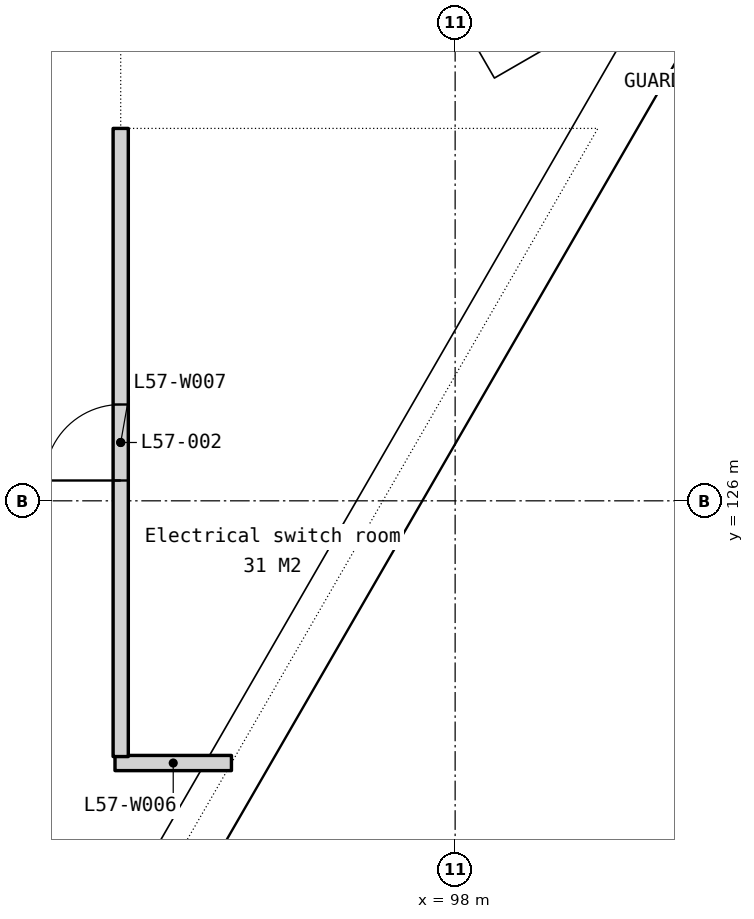
"""IFC4 building model, lengths in metres.
Left out: names, types, materials, properties, quantities, classifications, styles, units other than length and angle.
Written with IfcOpenShell. Run it as: python <this file> out.ifc"""

import sys

from ifc_helpers import new_model, si_unit, direction, frame, frame_2d, origin, place, context, subcontext, project, spatial, rectangle, extrude, element, fill, save


model = new_model("IFC4")
c1 = context("Model", 3, precision=1e-05, world=origin(), true_north=direction((0.0, 1.0)))
c2 = subcontext(c1, "Body", "Model", "MODEL_VIEW")
j1 = project(units=[si_unit("LENGTHUNIT", "METRE"), si_unit("PLANEANGLEUNIT", "RADIAN")], contexts=[c1])
p1 = place(None, origin())
s1 = spatial("IfcSite", under=j1, at=p1, CompositionType="ELEMENT")
p2 = place(p1, origin())
s2 = spatial("IfcBuilding", under=s1, at=p2, CompositionType="ELEMENT")
p3 = place(p2, frame((0.0, 0.0, 227.0)))
s3 = spatial("IfcBuildingStorey", under=s2, at=p3, CompositionType="ELEMENT", Elevation=227.0)
p4 = place(p3, frame((93.525, 122.55, 0.0), z_axis=(0.0, 0.0, 1.0), x_axis=(1.0, 0.0, 0.0)))
e1 = element("IfcWall", 1, at=p4, inside=s3, PredefinedType="PARTITIONING", context=c2, shape_type="SweptSolid", body=[
    extrude(rectangle(XDim=1.532, YDim=0.2, at=frame_2d((0.766, 0.0))), origin(), (0.0, 0.0, 1.0), 11.25),
])
p5 = place(p3, frame((93.6, 122.635, 0.0), z_axis=(0.0, 0.0, 1.0), x_axis=(0.0, 1.0, 0.0)))
e2 = element("IfcWall", 2, at=p5, inside=s3, PredefinedType="PARTITIONING", context=c2, shape_type="SweptSolid", body=[
    extrude(rectangle(XDim=8.265, YDim=0.2, at=frame_2d((4.132, 0.0))), origin(), (0.0, 0.0, 1.0), 11.25),
])
p6 = place(p5, frame((3.633, 0.0, 0.0)))
e3 = element("IfcOpeningElement", 3, at=p6, cuts=e2, PredefinedType="OPENING", context=c2, shape_type="SweptSolid", body=[
    extrude(rectangle(XDim=1.0, YDim=2.1, at=frame_2d((0.5, 1.05))), frame((0.0, 0.11, 0.0), z_axis=(0.0, -1.0, 0.0), x_axis=(1.0, 0.0, 0.0)), (0.0, 0.0, 1.0), 0.22),
])
p7 = place(p6, origin())
e4 = element("IfcDoor", 4, at=p7, inside=s3, OperationType="SINGLE_SWING_LEFT", PredefinedType="DOOR", context=c2, shape_type="SweptSolid", body=[
    extrude(rectangle(XDim=1.0, YDim=2.1, at=frame_2d((0.5, 1.05))), frame((0.0, 0.025, 0.0), z_axis=(0.0, -1.0, 0.0), x_axis=(1.0, 0.0, 0.0)), (0.0, 0.0, 1.0), 0.05),
])
fill(e3, e4)
save(model, sys.argv[1])
